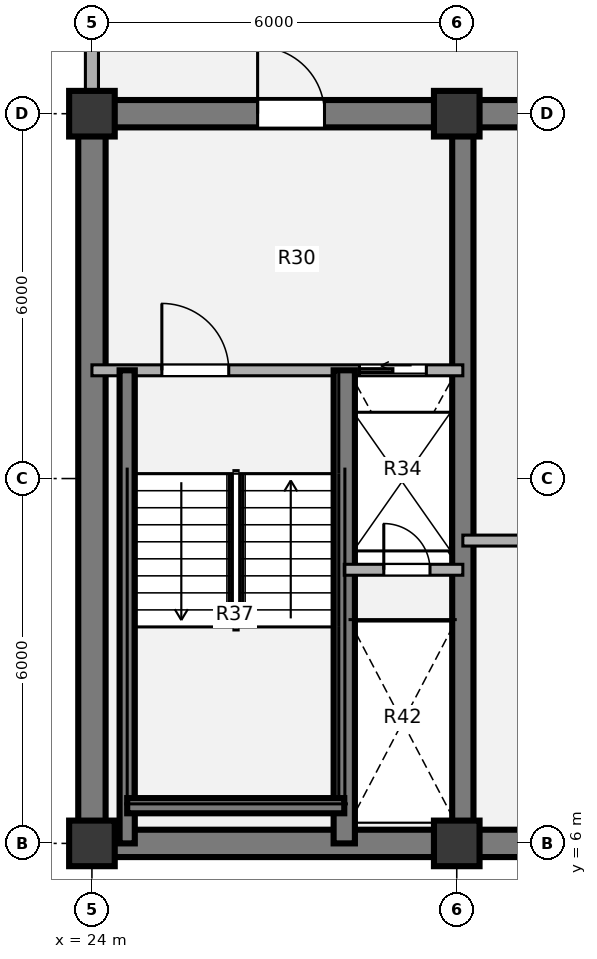
"""IFC4 building model, lengths in metres.
Left out: names, types, materials, properties, quantities, classifications, styles, units other than length and angle.
Written with IfcOpenShell. Run it as: python <this file> out.ifc"""

import sys

from ifc_helpers import new_model, si_unit, direction, frame, frame_2d, origin, origin_2d, place, context, subcontext, project, spatial, rectangle, extrude, source, transform, mapped, element, fill, save


model = new_model("IFC4")
c1 = context("Model", 3, precision=1e-05, world=origin(), true_north=direction((0.0, 1.0)))
c2 = subcontext(c1, "Body", "Model", "MODEL_VIEW")
j1 = project(units=[si_unit("LENGTHUNIT", "METRE"), si_unit("PLANEANGLEUNIT", "RADIAN")], contexts=[c1])
p1 = place(None, origin())
s1 = spatial("IfcSite", under=j1, at=p1, CompositionType="ELEMENT")
p2 = place(p1, origin())
s2 = spatial("IfcBuilding", under=s1, at=p2, CompositionType="ELEMENT")
p3 = place(p2, frame((0.0, 0.0, 198.0)))
s3 = spatial("IfcBuildingStorey", under=s2, at=p3, CompositionType="ELEMENT", Elevation=198.0)
m1 = source(origin(), c2, "Body", "SweptSolid", [
    extrude(rectangle(XDim=0.75, YDim=0.75, at=origin_2d()), origin(), (0.0, 0.0, 1.0), 3.78),
])
for number, where, z_axis, x_axis in (
    (1, (24.0, 6.0, 0.0), (0.0, 0.0, 1.0), (1.0, 0.0, 0.0)),
    (2, (30.0, 6.0, 0.0), (0.0, 0.0, 1.0), (1.0, 0.0, 0.0)),
    (3, (24.0, 18.0, 0.0), (0.0, 0.0, 1.0), (1.0, 0.0, 0.0)),
    (4, (30.0, 18.0, 0.0), (0.0, 0.0, 1.0), (1.0, 0.0, 0.0)),
):
    element("IfcColumn", number, at=place(p3, frame(where, z_axis=z_axis, x_axis=x_axis)), inside=s3, PredefinedType="COLUMN", context=c2, shape_type="MappedRepresentation", body=[
        mapped(m1, transform((0.0, 0.0, 0.0), x_axis=(1.0, 0.0, 0.0), y_axis=(0.0, 1.0, 0.0), z_axis=(0.0, 0.0, 1.0), scale=1.0)),
    ])
p4 = place(p3, frame((48.225, 6.0, 0.0), z_axis=(0.0, 0.0, 1.0), x_axis=(-1.0, 0.0, 0.0)))
e5 = element("IfcWall", 5, at=p4, inside=s3, PredefinedType="SHEAR", context=c2, shape_type="SweptSolid", body=[
    extrude(rectangle(XDim=24.45, YDim=0.45, at=frame_2d((12.225, 0.0))), origin(), (0.0, 0.0, 1.0), 3.78),
])
p5 = place(p3, frame((24.0, 6.0, 0.0), z_axis=(0.0, 0.0, 1.0), x_axis=(0.0, 1.0, 0.0)))
e6 = element("IfcWall", 6, at=p5, inside=s3, PredefinedType="SHEAR", context=c2, shape_type="SweptSolid", body=[
    extrude(rectangle(XDim=12.0, YDim=0.45, at=frame_2d((6.0, 0.0))), origin(), (0.0, 0.0, 1.0), 3.78),
])
p6 = place(p3, frame((23.775, 18.0, 0.0), z_axis=(0.0, 0.0, 1.0), x_axis=(1.0, 0.0, 0.0)))
e7 = element("IfcWall", 7, at=p6, inside=s3, PredefinedType="SHEAR", context=c2, shape_type="SweptSolid", body=[
    extrude(rectangle(XDim=9.425, YDim=0.45, at=frame_2d((4.712, 0.0))), origin(), (0.0, 0.0, 1.0), 3.78),
])
p7 = place(p6, frame((2.95, 0.0, 0.0)))
e8 = element("IfcOpeningElement", 8, at=p7, cuts=e7, PredefinedType="OPENING", context=c2, shape_type="SweptSolid", body=[
    extrude(rectangle(XDim=1.1, YDim=2.1, at=origin_2d()), frame((0.55, 0.235, 1.05), z_axis=(0.0, -1.0, 0.0), x_axis=(1.0, 0.0, 0.0)), (0.0, 0.0, 1.0), 0.47),
])
p8 = place(p3, frame((30.1, 6.0, 0.0), z_axis=(0.0, 0.0, 1.0), x_axis=(0.0, 1.0, 0.0)))
e9 = element("IfcWall", 9, at=p8, inside=s3, PredefinedType="SHEAR", context=c2, shape_type="SweptSolid", body=[
    extrude(rectangle(XDim=12.0, YDim=0.35, at=frame_2d((6.0, 0.0))), origin(), (0.0, 0.0, 1.0), 3.78),
])
p9 = place(p3, frame((24.0, 18.355, 0.0), z_axis=(0.0, 0.0, 1.0), x_axis=(0.0, 1.0, 0.0)))
e10 = element("IfcWall", 10, at=p9, inside=s3, PredefinedType="SOLIDWALL", context=c2, shape_type="SweptSolid", body=[
    extrude(rectangle(XDim=2.695, YDim=0.215, at=frame_2d((1.348, 0.0))), origin(), (0.0, 0.0, 1.0), 2.718),
])
p10 = place(p3, frame((30.1, 10.98, 0.0), z_axis=(0.0, 0.0, 1.0), x_axis=(1.0, 0.0, 0.0)))
e11 = element("IfcWall", 11, at=p10, inside=s3, PredefinedType="PARTITIONING", context=c2, shape_type="SweptSolid", body=[
    extrude(rectangle(XDim=4.08, YDim=0.18, at=frame_2d((2.04, 0.0))), origin(), (0.0, 0.0, 1.0), 3.5),
])
p11 = place(p3, frame((24.0, 13.78, 0.0), z_axis=(0.0, 0.0, 1.0), x_axis=(1.0, 0.0, 0.0)))
e12 = element("IfcWall", 12, at=p11, inside=s3, PredefinedType="PARTITIONING", context=c2, shape_type="SweptSolid", body=[
    extrude(rectangle(XDim=6.1, YDim=0.18, at=frame_2d((3.05, 0.0))), origin(), (0.0, 0.0, 1.0), 3.5),
])
p12 = place(p11, frame((1.15, 0.0, 0.0)))
e13 = element("IfcOpeningElement", 13, at=p12, cuts=e12, PredefinedType="OPENING", context=c2, shape_type="SweptSolid", body=[
    extrude(rectangle(XDim=1.1, YDim=2.1, at=origin_2d()), frame((0.55, 0.1, 1.05), z_axis=(0.0, -1.0, 0.0), x_axis=(1.0, 0.0, 0.0)), (0.0, 0.0, 1.0), 0.2),
])
p13 = place(p11, frame((4.4, 0.0, 0.0)))
e14 = element("IfcOpeningElement", 14, at=p13, cuts=e12, PredefinedType="OPENING", context=c2, shape_type="SweptSolid", body=[
    extrude(rectangle(XDim=1.1, YDim=2.1, at=origin_2d()), frame((0.55, 0.1, 1.05), z_axis=(0.0, -1.0, 0.0), x_axis=(1.0, 0.0, 0.0)), (0.0, 0.0, 1.0), 0.2),
])
p14 = place(p3, frame((28.15, 6.0, 0.0), z_axis=(0.0, 0.0, 1.0), x_axis=(0.0, 1.0, 0.0)))
e15 = element("IfcWall", 15, at=p14, inside=s3, PredefinedType="SHEAR", context=c2, shape_type="SweptSolid", body=[
    extrude(rectangle(XDim=7.78, YDim=0.35, at=frame_2d((3.89, 0.0))), origin(), (0.0, 0.0, 1.0), 3.85),
])
p15 = place(p3, frame((24.58, 6.0, 0.0), z_axis=(0.0, 0.0, 1.0), x_axis=(0.0, 1.0, 0.0)))
e16 = element("IfcWall", 16, at=p15, inside=s3, PredefinedType="SHEAR", context=c2, shape_type="SweptSolid", body=[
    extrude(rectangle(XDim=7.78, YDim=0.25, at=frame_2d((3.89, 0.0))), origin(), (0.0, 0.0, 1.0), 3.85),
])
p16 = place(p3, frame((24.58, 6.62, 0.0), z_axis=(0.0, 0.0, 1.0), x_axis=(1.0, 0.0, 0.0)))
e17 = element("IfcWall", 17, at=p16, inside=s3, PredefinedType="SHEAR", context=c2, shape_type="SweptSolid", body=[
    extrude(rectangle(XDim=3.57, YDim=0.25, at=frame_2d((1.785, 0.0))), origin(), (0.0, 0.0, 1.0), 3.85),
])
p17 = place(p3, frame((28.15, 10.5, 0.0), z_axis=(0.0, 0.0, 1.0), x_axis=(1.0, 0.0, 0.0)))
e18 = element("IfcWall", 18, at=p17, inside=s3, PredefinedType="PARTITIONING", context=c2, shape_type="SweptSolid", body=[
    extrude(rectangle(XDim=1.95, YDim=0.18, at=frame_2d((0.975, 0.0))), origin(), (0.0, 0.0, 1.0), 3.5),
])
p18 = place(p17, frame((0.65, 0.0, 0.0)))
e19 = element("IfcOpeningElement", 19, at=p18, cuts=e18, PredefinedType="OPENING", context=c2, shape_type="SweptSolid", body=[
    extrude(rectangle(XDim=0.76, YDim=2.05, at=origin_2d()), frame((0.38, 0.1, 1.025), z_axis=(0.0, -1.0, 0.0), x_axis=(1.0, 0.0, 0.0)), (0.0, 0.0, 1.0), 0.2),
])
m2 = source(origin(), c2, "Body", "SweptSolid", [
    extrude(rectangle(XDim=1.1, YDim=2.1, at=origin_2d()), frame((0.55, 0.025, 1.05), z_axis=(0.0, -1.0, 0.0), x_axis=(1.0, 0.0, 0.0)), (0.0, 0.0, 1.0), 0.05),
])
p19 = place(p12, origin())
e20 = element("IfcDoor", 20, at=p19, inside=s3, OperationType="SINGLE_SWING_LEFT", PredefinedType="DOOR", context=c2, shape_type="MappedRepresentation", body=[
    mapped(m2, transform((0.0, 0.0, 0.0), x_axis=(1.0, 0.0, 0.0), y_axis=(0.0, 1.0, 0.0), z_axis=(0.0, 0.0, 1.0), scale=1.0)),
])
fill(e13, e20)
m3 = source(origin(), c2, "Body", "SweptSolid", [
    extrude(rectangle(XDim=1.1, YDim=2.1, at=origin_2d()), frame((0.55, 0.025, 1.05), z_axis=(0.0, -1.0, 0.0), x_axis=(1.0, 0.0, 0.0)), (0.0, 0.0, 1.0), 0.05),
])
p20 = place(p13, origin())
e21 = element("IfcDoor", 21, at=p20, inside=s3, OperationType="SLIDING_TO_LEFT", PredefinedType="DOOR", context=c2, shape_type="MappedRepresentation", body=[
    mapped(m3, transform((0.0, 0.0, 0.0), x_axis=(1.0, 0.0, 0.0), y_axis=(0.0, 1.0, 0.0), z_axis=(0.0, 0.0, 1.0), scale=1.0)),
])
fill(e14, e21)
m4 = source(origin(), c2, "Body", "SweptSolid", [
    extrude(rectangle(XDim=0.76, YDim=2.05, at=origin_2d()), frame((0.38, 0.025, 1.025), z_axis=(0.0, -1.0, 0.0), x_axis=(1.0, 0.0, 0.0)), (0.0, 0.0, 1.0), 0.05),
])
p21 = place(p18, origin())
e22 = element("IfcDoor", 22, at=p21, inside=s3, OperationType="SINGLE_SWING_LEFT", PredefinedType="DOOR", context=c2, shape_type="MappedRepresentation", body=[
    mapped(m4, transform((0.0, 0.0, 0.0), x_axis=(1.0, 0.0, 0.0), y_axis=(0.0, 1.0, 0.0), z_axis=(0.0, 0.0, 1.0), scale=1.0)),
])
fill(e19, e22)
m5 = source(origin(), c2, "Body", "SweptSolid", [
    extrude(rectangle(XDim=1.1, YDim=2.1, at=origin_2d()), frame((0.55, 0.025, 1.05), z_axis=(0.0, -1.0, 0.0), x_axis=(1.0, 0.0, 0.0)), (0.0, 0.0, 1.0), 0.05),
])
p22 = place(p7, origin())
e23 = element("IfcDoor", 23, at=p22, inside=s3, OperationType="SINGLE_SWING_LEFT", PredefinedType="DOOR", context=c2, shape_type="MappedRepresentation", body=[
    mapped(m5, transform((0.0, 0.0, 0.0), x_axis=(1.0, 0.0, 0.0), y_axis=(0.0, 1.0, 0.0), z_axis=(0.0, 0.0, 1.0), scale=1.0)),
])
fill(e8, e23)
save(model, sys.argv[1])
